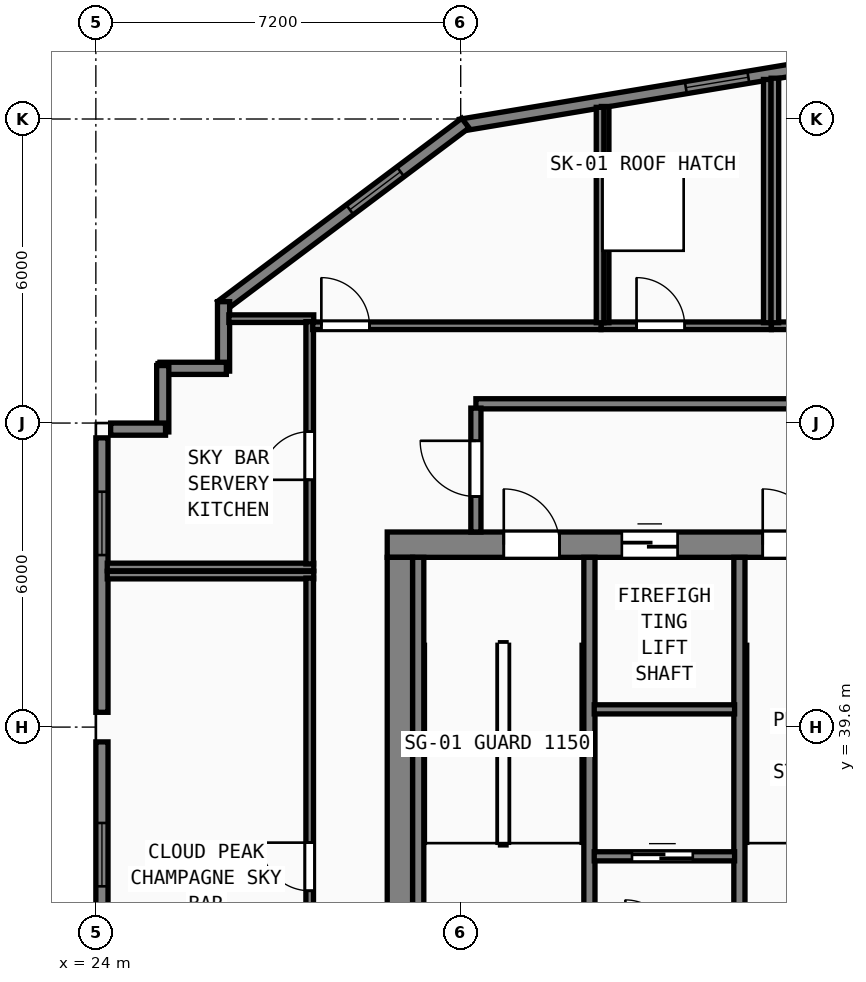
"""IFC4 building model, lengths in metres.
Left out: names, types, materials, properties, quantities, classifications, styles, units other than length and angle.
Written with IfcOpenShell. Run it as: python <this file> out.ifc"""

import sys

from ifc_helpers import new_model, si_unit, direction, frame, frame_2d, origin, origin_2d, place, context, subcontext, project, spatial, rectangle, hollow_rectangle, extrude, element, fill, save


model = new_model("IFC4")
c1 = context("Model", 3, precision=1e-05, world=origin(), true_north=direction((0.0, 1.0)))
c2 = subcontext(c1, "Body", "Model", "MODEL_VIEW")
j1 = project(units=[si_unit("LENGTHUNIT", "METRE"), si_unit("PLANEANGLEUNIT", "RADIAN")], contexts=[c1])
p1 = place(None, origin())
s1 = spatial("IfcSite", under=j1, at=p1, CompositionType="ELEMENT")
p2 = place(p1, origin())
s2 = spatial("IfcBuilding", under=s1, at=p2, CompositionType="ELEMENT")
p3 = place(p2, frame((0.0, 0.0, 323.2)))
s3 = spatial("IfcBuildingStorey", under=s2, at=p3, CompositionType="ELEMENT", Elevation=323.2)
p4 = place(p3, frame((29.75, 43.2, 0.0), z_axis=(0.0, 0.0, 1.0), x_axis=(1.0, 0.0, 0.0)))
e1 = element("IfcWall", 1, at=p4, inside=s3, PredefinedType="SHEAR", context=c2, shape_type="SweptSolid", body=[
    extrude(rectangle(XDim=17.3, YDim=0.5, at=frame_2d((8.65, 0.0))), origin(), (0.0, 0.0, 1.0), 4.75),
])
p5 = place(p4, frame((2.3, 0.0, 0.0)))
e2 = element("IfcOpeningElement", 2, at=p5, cuts=e1, PredefinedType="OPENING", context=c2, shape_type="SweptSolid", body=[
    extrude(rectangle(XDim=1.1, YDim=2.15, at=frame_2d((0.55, 1.075))), frame((0.0, 0.26, 0.0), z_axis=(0.0, -1.0, 0.0), x_axis=(1.0, 0.0, 0.0)), (0.0, 0.0, 1.0), 0.52),
])
p6 = place(p4, frame((7.41, 0.0, 0.0)))
e3 = element("IfcOpeningElement", 3, at=p6, cuts=e1, PredefinedType="OPENING", context=c2, shape_type="SweptSolid", body=[
    extrude(rectangle(XDim=1.1, YDim=2.15, at=frame_2d((0.55, 1.075))), frame((0.0, 0.26, 0.0), z_axis=(0.0, -1.0, 0.0), x_axis=(1.0, 0.0, 0.0)), (0.0, 0.0, 1.0), 0.52),
])
p7 = place(p4, frame((13.5, 0.0, 0.0)))
e4 = element("IfcOpeningElement", 4, at=p7, cuts=e1, PredefinedType="OPENING", context=c2, shape_type="SweptSolid", body=[
    extrude(rectangle(XDim=1.1, YDim=2.15, at=frame_2d((0.55, 1.075))), frame((0.0, 0.26, 0.0), z_axis=(0.0, -1.0, 0.0), x_axis=(1.0, 0.0, 0.0)), (0.0, 0.0, 1.0), 0.52),
])
p8 = place(p4, frame((4.63, 0.0, 0.0)))
e5 = element("IfcOpeningElement", 5, at=p8, cuts=e1, PredefinedType="OPENING", context=c2, shape_type="SweptSolid", body=[
    extrude(rectangle(XDim=1.1, YDim=2.2, at=frame_2d((0.55, 1.1))), frame((0.0, 0.26, 0.0), z_axis=(0.0, -1.0, 0.0), x_axis=(1.0, 0.0, 0.0)), (0.0, 0.0, 1.0), 0.52),
])
p9 = place(p4, frame((10.99, 0.0, 0.0)))
e6 = element("IfcOpeningElement", 6, at=p9, cuts=e1, PredefinedType="OPENING", context=c2, shape_type="SweptSolid", body=[
    extrude(rectangle(XDim=1.1, YDim=2.2, at=frame_2d((0.55, 1.1))), frame((0.0, 0.26, 0.0), z_axis=(0.0, -1.0, 0.0), x_axis=(1.0, 0.0, 0.0)), (0.0, 0.0, 1.0), 0.52),
])
p10 = place(p3, frame((30.0, 32.8, 0.0), z_axis=(0.0, 0.0, 1.0), x_axis=(0.0, 1.0, 0.0)))
e7 = element("IfcWall", 7, at=p10, inside=s3, PredefinedType="SHEAR", context=c2, shape_type="SweptSolid", body=[
    extrude(rectangle(XDim=10.15, YDim=0.5, at=frame_2d((5.075, 0.0))), origin(), (0.0, 0.0, 1.0), 4.75),
])
for number, where, z_axis, x_axis in (
    (8, (30.362, 35.39, 0.0), (0.0, 0.0, 1.0), (0.0, 1.0, 0.0)),
    (9, (33.74, 35.39, 0.0), (0.0, 0.0, 1.0), (0.0, 1.0, 0.0)),
    (10, (36.7, 35.39, 0.0), (0.0, 0.0, 1.0), (0.0, 1.0, 0.0)),
):
    element("IfcWall", number, at=place(p3, frame(where, z_axis=z_axis, x_axis=x_axis)), inside=s3, PredefinedType="SHEAR", context=c2, shape_type="SweptSolid", body=[
        extrude(rectangle(XDim=7.56, YDim=0.22, at=frame_2d((3.78, 0.0))), origin(), (0.0, 0.0, 1.0), 4.75),
    ])
for number, where, z_axis, x_axis in (
    (11, (24.0, 45.6, 0.0), (0.0, 0.0, 1.0), (1.0, 0.0, 0.0)),
    (12, (31.2, 50.4, 0.0), (0.0, 0.0, 1.0), (1.0, 0.0, 0.0)),
    (13, (24.0, 39.6, 0.0), (0.0, 0.0, 1.0), (1.0, 0.0, 0.0)),
):
    element("IfcColumn", number, at=place(p3, frame(where, z_axis=z_axis, x_axis=x_axis)), inside=s3, PredefinedType="COLUMN", context=c2, shape_type="SweptSolid", body=[
        extrude(hollow_rectangle(XDim=0.6, YDim=0.6, WallThickness=0.024, at=origin_2d()), origin(), (0.0, 0.0, 1.0), 5.0),
    ])
p11 = place(p3, frame((38.454, 52.687, 0.0), z_axis=(0.0, 0.0, 1.0), x_axis=(-0.986394820321, -0.164393608283, 0.0)))
e14 = element("IfcWall", 14, at=p11, inside=s3, PredefinedType="SOLIDWALL", context=c2, shape_type="SweptSolid", body=[
    extrude(rectangle(XDim=7.36, YDim=0.24, at=frame_2d((3.68, 0.0))), origin(), (0.0, 0.0, 1.0), 4.75),
])
p12 = place(p11, frame((1.6, 0.0, 0.85)))
e15 = element("IfcOpeningElement", 15, at=p12, cuts=e14, PredefinedType="OPENING", context=c2, shape_type="SweptSolid", body=[
    extrude(rectangle(XDim=1.25, YDim=1.95, at=frame_2d((0.625, 0.975))), frame((0.0, 0.13, 0.0), z_axis=(0.0, -1.0, 0.0), x_axis=(1.0, 0.0, 0.0)), (0.0, 0.0, 1.0), 0.26),
])
p13 = place(p3, frame((31.292, 51.519, 0.0), z_axis=(0.0, 0.0, 1.0), x_axis=(-0.8, -0.6, 0.0)))
e16 = element("IfcWall", 16, at=p13, inside=s3, PredefinedType="SOLIDWALL", context=c2, shape_type="SweptSolid", body=[
    extrude(rectangle(XDim=6.021, YDim=0.24, at=frame_2d((3.01, 0.0))), origin(), (0.0, 0.0, 1.0), 4.75),
])
p14 = place(p13, frame((1.6, 0.0, 0.85)))
e17 = element("IfcOpeningElement", 17, at=p14, cuts=e16, PredefinedType="OPENING", context=c2, shape_type="SweptSolid", body=[
    extrude(rectangle(XDim=1.25, YDim=1.95, at=frame_2d((0.625, 0.975))), frame((0.0, 0.13, 0.0), z_axis=(0.0, -1.0, 0.0), x_axis=(1.0, 0.0, 0.0)), (0.0, 0.0, 1.0), 0.26),
])
p15 = place(p3, frame((26.52, 47.995, 0.0), z_axis=(0.0, 0.0, 1.0), x_axis=(0.0, -1.0, 0.0)))
e18 = element("IfcWall", 18, at=p15, inside=s3, PredefinedType="SOLIDWALL", context=c2, shape_type="SweptSolid", body=[
    extrude(rectangle(XDim=1.37, YDim=0.24, at=frame_2d((0.685, 0.0))), origin(), (0.0, 0.0, 1.0), 4.75),
])
for number, where, z_axis, x_axis in (
    (19, (26.575, 46.68, 0.0), (0.0, 0.0, 1.0), (-1.0, 0.0, 0.0)),
    (20, (25.32, 46.735, 0.0), (0.0, 0.0, 1.0), (0.0, -1.0, 0.0)),
):
    element("IfcWall", number, at=place(p3, frame(where, z_axis=z_axis, x_axis=x_axis)), inside=s3, PredefinedType="SOLIDWALL", context=c2, shape_type="SweptSolid", body=[
        extrude(rectangle(XDim=1.31, YDim=0.24, at=frame_2d((0.655, 0.0))), origin(), (0.0, 0.0, 1.0), 4.75),
    ])
p16 = place(p3, frame((25.375, 45.48, 0.0), z_axis=(0.0, 0.0, 1.0), x_axis=(-1.0, 0.0, 0.0)))
e21 = element("IfcWall", 21, at=p16, inside=s3, PredefinedType="SOLIDWALL", context=c2, shape_type="SweptSolid", body=[
    extrude(rectangle(XDim=1.083, YDim=0.24, at=frame_2d((0.542, 0.0))), origin(), (0.0, 0.0, 1.0), 4.75),
])
p17 = place(p3, frame((24.12, 45.308, 0.0), z_axis=(0.0, 0.0, 1.0), x_axis=(0.0, -1.0, 0.0)))
e22 = element("IfcWall", 22, at=p17, inside=s3, PredefinedType="SOLIDWALL", context=c2, shape_type="SweptSolid", body=[
    extrude(rectangle(XDim=5.416, YDim=0.24, at=frame_2d((2.708, 0.0))), origin(), (0.0, 0.0, 1.0), 4.75),
])
p18 = place(p17, frame((1.063, 0.0, 0.85)))
e23 = element("IfcOpeningElement", 23, at=p18, cuts=e22, PredefinedType="OPENING", context=c2, shape_type="SweptSolid", body=[
    extrude(rectangle(XDim=1.25, YDim=1.95, at=frame_2d((0.625, 0.975))), frame((0.0, 0.13, 0.0), z_axis=(0.0, -1.0, 0.0), x_axis=(1.0, 0.0, 0.0)), (0.0, 0.0, 1.0), 0.26),
])
p19 = place(p3, frame((24.12, 39.308, 0.0), z_axis=(0.0, 0.0, 1.0), x_axis=(0.0, -1.0, 0.0)))
e24 = element("IfcWall", 24, at=p19, inside=s3, PredefinedType="SOLIDWALL", context=c2, shape_type="SweptSolid", body=[
    extrude(rectangle(XDim=5.416, YDim=0.24, at=frame_2d((2.708, 0.0))), origin(), (0.0, 0.0, 1.0), 4.75),
])
p20 = place(p19, frame((1.6, 0.0, 0.85)))
e25 = element("IfcOpeningElement", 25, at=p20, cuts=e24, PredefinedType="OPENING", context=c2, shape_type="SweptSolid", body=[
    extrude(rectangle(XDim=1.25, YDim=1.95, at=frame_2d((0.625, 0.975))), frame((0.0, 0.13, 0.0), z_axis=(0.0, -1.0, 0.0), x_axis=(1.0, 0.0, 0.0)), (0.0, 0.0, 1.0), 0.26),
])
p21 = place(p3, frame((31.5, 45.98, 0.0), z_axis=(0.0, 0.0, 1.0), x_axis=(1.0, 0.0, 0.0)))
e26 = element("IfcWall", 26, at=p21, inside=s3, PredefinedType="SOLIDWALL", context=c2, shape_type="SweptSolid", body=[
    extrude(rectangle(XDim=13.8, YDim=0.2, at=frame_2d((6.9, 0.0))), origin(), (0.0, 0.0, 1.0), 4.75),
])
p22 = place(p3, frame((31.5, 43.45, 0.0), z_axis=(0.0, 0.0, 1.0), x_axis=(0.0, 1.0, 0.0)))
e27 = element("IfcWall", 27, at=p22, inside=s3, PredefinedType="SOLIDWALL", context=c2, shape_type="SweptSolid", body=[
    extrude(rectangle(XDim=2.445, YDim=0.2, at=frame_2d((1.223, 0.0))), origin(), (0.0, 0.0, 1.0), 4.75),
])
p23 = place(p22, frame((1.8, 0.0, 0.0), z_axis=(0.0, 0.0, 1.0), x_axis=(-1.0, 0.0, 0.0)))
e28 = element("IfcOpeningElement", 28, at=p23, cuts=e27, PredefinedType="OPENING", context=c2, shape_type="SweptSolid", body=[
    extrude(rectangle(XDim=1.1, YDim=2.15, at=frame_2d((0.55, 1.075))), frame((0.0, 0.11, 0.0), z_axis=(0.0, -1.0, 0.0), x_axis=(1.0, 0.0, 0.0)), (0.0, 0.0, 1.0), 0.22),
])
p24 = place(p3, frame((33.835, 39.95, 0.0), z_axis=(0.0, 0.0, 1.0), x_axis=(1.0, 0.0, 0.0)))
e29 = element("IfcWall", 29, at=p24, inside=s3, PredefinedType="SOLIDWALL", context=c2, shape_type="SweptSolid", body=[
    extrude(rectangle(XDim=2.77, YDim=0.18, at=frame_2d((1.385, 0.0))), origin(), (0.0, 0.0, 1.0), 4.75),
])
p25 = place(p3, frame((33.835, 37.05, 0.0), z_axis=(0.0, 0.0, 1.0), x_axis=(1.0, 0.0, 0.0)))
e30 = element("IfcWall", 30, at=p25, inside=s3, PredefinedType="SOLIDWALL", context=c2, shape_type="SweptSolid", body=[
    extrude(rectangle(XDim=2.77, YDim=0.18, at=frame_2d((1.385, 0.0))), origin(), (0.0, 0.0, 1.0), 4.75),
])
p26 = place(p25, frame((1.945, 0.0, 0.0), z_axis=(0.0, 0.0, 1.0), x_axis=(-1.0, 0.0, 0.0)))
e31 = element("IfcOpeningElement", 31, at=p26, cuts=e30, PredefinedType="OPENING", context=c2, shape_type="SweptSolid", body=[
    extrude(rectangle(XDim=1.2, YDim=2.2, at=frame_2d((0.6, 1.1))), frame((0.0, 0.1, 0.0), z_axis=(0.0, -1.0, 0.0), x_axis=(1.0, 0.0, 0.0)), (0.0, 0.0, 1.0), 0.2),
])
p27 = place(p3, frame((33.97, 47.52, 0.0), z_axis=(0.0, 0.0, 1.0), x_axis=(1.0, 0.0, 0.0)))
e32 = element("IfcWall", 32, at=p27, inside=s3, PredefinedType="PARTITIONING", context=c2, shape_type="SweptSolid", body=[
    extrude(rectangle(XDim=3.36, YDim=0.15, at=frame_2d((1.68, 0.0))), origin(), (0.0, 0.0, 1.0), 4.75),
])
p28 = place(p27, frame((0.7, 0.0, 0.0)))
e33 = element("IfcOpeningElement", 33, at=p28, cuts=e32, PredefinedType="OPENING", context=c2, shape_type="SweptSolid", body=[
    extrude(rectangle(XDim=0.95, YDim=2.12, at=frame_2d((0.475, 1.06))), frame((0.0, 0.085, 0.0), z_axis=(0.0, -1.0, 0.0), x_axis=(1.0, 0.0, 0.0)), (0.0, 0.0, 1.0), 0.17),
])
p29 = place(p3, frame((34.05, 47.58, 0.0), z_axis=(0.0, 0.0, 1.0), x_axis=(0.0, 1.0, 0.0)))
e34 = element("IfcWall", 34, at=p29, inside=s3, PredefinedType="PARTITIONING", context=c2, shape_type="SweptSolid", body=[
    extrude(rectangle(XDim=4.267, YDim=0.15, at=frame_2d((2.133, 0.0))), origin(), (0.0, 0.0, 1.0), 4.75),
])
p30 = place(p3, frame((37.25, 47.58, 0.0), z_axis=(0.0, 0.0, 1.0), x_axis=(0.0, 1.0, 0.0)))
e35 = element("IfcWall", 35, at=p30, inside=s3, PredefinedType="PARTITIONING", context=c2, shape_type="SweptSolid", body=[
    extrude(rectangle(XDim=4.8, YDim=0.15, at=frame_2d((2.4, 0.0))), origin(), (0.0, 0.0, 1.0), 4.75),
])
p31 = place(p3, frame((37.332, 47.52, 0.0), z_axis=(0.0, 0.0, 1.0), x_axis=(1.0, 0.0, 0.0)))
e36 = element("IfcWall", 36, at=p31, inside=s3, PredefinedType="PARTITIONING", context=c2, shape_type="SweptSolid", body=[
    extrude(rectangle(XDim=3.348, YDim=0.15, at=frame_2d((1.674, 0.0))), origin(), (0.0, 0.0, 1.0), 4.75),
])
p32 = place(p31, frame((0.688, 0.0, 0.0)))
e37 = element("IfcOpeningElement", 37, at=p32, cuts=e36, PredefinedType="OPENING", context=c2, shape_type="SweptSolid", body=[
    extrude(rectangle(XDim=0.95, YDim=2.12, at=frame_2d((0.475, 1.06))), frame((0.0, 0.085, 0.0), z_axis=(0.0, -1.0, 0.0), x_axis=(1.0, 0.0, 0.0)), (0.0, 0.0, 1.0), 0.17),
])
p33 = place(p3, frame((37.4, 47.58, 0.0), z_axis=(0.0, 0.0, 1.0), x_axis=(0.0, 1.0, 0.0)))
e38 = element("IfcWall", 38, at=p33, inside=s3, PredefinedType="PARTITIONING", context=c2, shape_type="SweptSolid", body=[
    extrude(rectangle(XDim=4.825, YDim=0.15, at=frame_2d((2.413, 0.0))), origin(), (0.0, 0.0, 1.0), 4.75),
])
p34 = place(p3, frame((24.225, 42.6, 0.0), z_axis=(0.0, 0.0, 1.0), x_axis=(1.0, 0.0, 0.0)))
e39 = element("IfcWall", 39, at=p34, inside=s3, PredefinedType="PARTITIONING", context=c2, shape_type="SweptSolid", body=[
    extrude(rectangle(XDim=4.075, YDim=0.15, at=frame_2d((2.038, 0.0))), origin(), (0.0, 0.0, 1.0), 4.75),
])
p35 = place(p3, frame((28.22, 32.91, 0.0), z_axis=(0.0, 0.0, 1.0), x_axis=(0.0, 1.0, 0.0)))
e40 = element("IfcWall", 40, at=p35, inside=s3, PredefinedType="PARTITIONING", context=c2, shape_type="SweptSolid", body=[
    extrude(rectangle(XDim=9.63, YDim=0.15, at=frame_2d((4.815, 0.0))), origin(), (0.0, 0.0, 1.0), 4.75),
])
p36 = place(p35, frame((4.41, 0.0, 0.0), z_axis=(0.0, 0.0, 1.0), x_axis=(-1.0, 0.0, 0.0)))
e41 = element("IfcOpeningElement", 41, at=p36, cuts=e40, PredefinedType="OPENING", context=c2, shape_type="SweptSolid", body=[
    extrude(rectangle(XDim=0.95, YDim=2.12, at=frame_2d((0.475, 1.06))), frame((0.0, 0.085, 0.0), z_axis=(0.0, -1.0, 0.0), x_axis=(1.0, 0.0, 0.0)), (0.0, 0.0, 1.0), 0.17),
])
p37 = place(p3, frame((26.625, 47.66, 0.0), z_axis=(0.0, 0.0, 1.0), x_axis=(1.0, 0.0, 0.0)))
e42 = element("IfcWall", 42, at=p37, inside=s3, PredefinedType="PARTITIONING", context=c2, shape_type="SweptSolid", body=[
    extrude(rectangle(XDim=1.675, YDim=0.15, at=frame_2d((0.837, 0.0))), origin(), (0.0, 0.0, 1.0), 4.75),
])
p38 = place(p3, frame((24.225, 42.76, 0.0), z_axis=(0.0, 0.0, 1.0), x_axis=(1.0, 0.0, 0.0)))
e43 = element("IfcWall", 43, at=p38, inside=s3, PredefinedType="PARTITIONING", context=c2, shape_type="SweptSolid", body=[
    extrude(rectangle(XDim=4.075, YDim=0.15, at=frame_2d((2.038, 0.0))), origin(), (0.0, 0.0, 1.0), 4.75),
])
p39 = place(p3, frame((28.22, 42.82, 0.0), z_axis=(0.0, 0.0, 1.0), x_axis=(0.0, 1.0, 0.0)))
e44 = element("IfcWall", 44, at=p39, inside=s3, PredefinedType="PARTITIONING", context=c2, shape_type="SweptSolid", body=[
    extrude(rectangle(XDim=4.78, YDim=0.15, at=frame_2d((2.39, 0.0))), origin(), (0.0, 0.0, 1.0), 4.75),
])
p40 = place(p39, frame((2.61, 0.0, 0.0), z_axis=(0.0, 0.0, 1.0), x_axis=(-1.0, 0.0, 0.0)))
e45 = element("IfcOpeningElement", 45, at=p40, cuts=e44, PredefinedType="OPENING", context=c2, shape_type="SweptSolid", body=[
    extrude(rectangle(XDim=0.95, YDim=2.12, at=frame_2d((0.475, 1.06))), frame((0.0, 0.085, 0.0), z_axis=(0.0, -1.0, 0.0), x_axis=(1.0, 0.0, 0.0)), (0.0, 0.0, 1.0), 0.17),
])
p41 = place(p3, frame((28.28, 47.52, 0.0), z_axis=(0.0, 0.0, 1.0), x_axis=(1.0, 0.0, 0.0)))
e46 = element("IfcWall", 46, at=p41, inside=s3, PredefinedType="PARTITIONING", context=c2, shape_type="SweptSolid", body=[
    extrude(rectangle(XDim=5.688, YDim=0.15, at=frame_2d((2.844, 0.0))), origin(), (0.0, 0.0, 1.0), 4.75),
])
p42 = place(p41, frame((0.17, 0.0, 0.0)))
e47 = element("IfcOpeningElement", 47, at=p42, cuts=e46, PredefinedType="OPENING", context=c2, shape_type="SweptSolid", body=[
    extrude(rectangle(XDim=0.95, YDim=2.12, at=frame_2d((0.475, 1.06))), frame((0.0, 0.085, 0.0), z_axis=(0.0, -1.0, 0.0), x_axis=(1.0, 0.0, 0.0)), (0.0, 0.0, 1.0), 0.17),
])
p43 = place(p3, frame((33.95, 47.58, 0.0), z_axis=(0.0, 0.0, 1.0), x_axis=(0.0, 1.0, 0.0)))
e48 = element("IfcWall", 48, at=p43, inside=s3, PredefinedType="PARTITIONING", context=c2, shape_type="SweptSolid", body=[
    extrude(rectangle(XDim=4.25, YDim=0.15, at=frame_2d((2.125, 0.0))), origin(), (0.0, 0.0, 1.0), 4.75),
])
p44 = place(p12, origin())
e49 = element("IfcWindow", 49, at=p44, inside=s3, PartitioningType="SINGLE_PANEL", PredefinedType="WINDOW", context=c2, shape_type="SweptSolid", body=[
    extrude(rectangle(XDim=1.25, YDim=1.95, at=frame_2d((0.625, 0.975))), frame((0.0, 0.03, 0.0), z_axis=(0.0, -1.0, 0.0), x_axis=(1.0, 0.0, 0.0)), (0.0, 0.0, 1.0), 0.06),
])
fill(e15, e49)
p45 = place(p14, origin())
e50 = element("IfcWindow", 50, at=p45, inside=s3, PartitioningType="SINGLE_PANEL", PredefinedType="WINDOW", context=c2, shape_type="SweptSolid", body=[
    extrude(rectangle(XDim=1.25, YDim=1.95, at=frame_2d((0.625, 0.975))), frame((0.0, 0.03, 0.0), z_axis=(0.0, -1.0, 0.0), x_axis=(1.0, 0.0, 0.0)), (0.0, 0.0, 1.0), 0.06),
])
fill(e17, e50)
p46 = place(p18, origin())
e51 = element("IfcWindow", 51, at=p46, inside=s3, PartitioningType="SINGLE_PANEL", PredefinedType="WINDOW", context=c2, shape_type="SweptSolid", body=[
    extrude(rectangle(XDim=1.25, YDim=1.95, at=frame_2d((0.625, 0.975))), frame((0.0, 0.03, 0.0), z_axis=(0.0, -1.0, 0.0), x_axis=(1.0, 0.0, 0.0)), (0.0, 0.0, 1.0), 0.06),
])
fill(e23, e51)
p47 = place(p20, origin())
e52 = element("IfcWindow", 52, at=p47, inside=s3, PartitioningType="SINGLE_PANEL", PredefinedType="WINDOW", context=c2, shape_type="SweptSolid", body=[
    extrude(rectangle(XDim=1.25, YDim=1.95, at=frame_2d((0.625, 0.975))), frame((0.0, 0.03, 0.0), z_axis=(0.0, -1.0, 0.0), x_axis=(1.0, 0.0, 0.0)), (0.0, 0.0, 1.0), 0.06),
])
fill(e25, e52)
p48 = place(p3, frame((0.0, 0.0, -0.24)))
p49 = place(p48, frame((34.8, 49.8, 0.0)))
p50 = place(p49, frame((0.0, 0.0, 0.19)))
e53 = element("IfcWindow", 53, at=p50, inside=s3, PartitioningType="SINGLE_PANEL", PredefinedType="SKYLIGHT", context=c2, shape_type="SweptSolid", body=[
    extrude(rectangle(XDim=1.6, YDim=1.6, at=origin_2d()), origin(), (0.0, 0.0, 1.0), 0.05),
])
p51 = place(p5, origin())
e54 = element("IfcDoor", 54, at=p51, inside=s3, OperationType="SINGLE_SWING_LEFT", PredefinedType="DOOR", context=c2, shape_type="SweptSolid", body=[
    extrude(rectangle(XDim=1.1, YDim=2.15, at=frame_2d((0.55, 1.075))), frame((0.0, 0.185, 0.0), z_axis=(0.0, -1.0, 0.0), x_axis=(1.0, 0.0, 0.0)), (0.0, 0.0, 1.0), 0.05),
])
fill(e2, e54)
p52 = place(p6, origin())
e55 = element("IfcDoor", 55, at=p52, inside=s3, OperationType="SINGLE_SWING_LEFT", PredefinedType="DOOR", context=c2, shape_type="SweptSolid", body=[
    extrude(rectangle(XDim=1.1, YDim=2.15, at=frame_2d((0.55, 1.075))), frame((0.0, 0.185, 0.0), z_axis=(0.0, -1.0, 0.0), x_axis=(1.0, 0.0, 0.0)), (0.0, 0.0, 1.0), 0.05),
])
fill(e3, e55)
p53 = place(p23, origin())
e56 = element("IfcDoor", 56, at=p53, inside=s3, OperationType="SINGLE_SWING_LEFT", PredefinedType="DOOR", context=c2, shape_type="SweptSolid", body=[
    extrude(rectangle(XDim=1.1, YDim=2.15, at=frame_2d((0.55, 1.075))), frame((0.0, 0.025, 0.0), z_axis=(0.0, -1.0, 0.0), x_axis=(1.0, 0.0, 0.0)), (0.0, 0.0, 1.0), 0.05),
])
fill(e28, e56)
p54 = place(p8, origin())
e57 = element("IfcDoor", 57, at=p54, inside=s3, OperationType="SLIDING_TO_LEFT", PredefinedType="DOOR", context=c2, shape_type="SweptSolid", body=[
    extrude(rectangle(XDim=1.1, YDim=2.2, at=frame_2d((0.55, 1.1))), frame((0.0, 0.185, 0.0), z_axis=(0.0, -1.0, 0.0), x_axis=(1.0, 0.0, 0.0)), (0.0, 0.0, 1.0), 0.05),
])
fill(e5, e57)
p55 = place(p26, origin())
e58 = element("IfcDoor", 58, at=p55, inside=s3, OperationType="SLIDING_TO_RIGHT", PredefinedType="DOOR", context=c2, shape_type="SweptSolid", body=[
    extrude(rectangle(XDim=1.2, YDim=2.2, at=frame_2d((0.6, 1.1))), frame((0.0, 0.025, 0.0), z_axis=(0.0, -1.0, 0.0), x_axis=(1.0, 0.0, 0.0)), (0.0, 0.0, 1.0), 0.05),
])
fill(e31, e58)
p56 = place(p28, origin())
e59 = element("IfcDoor", 59, at=p56, inside=s3, OperationType="SINGLE_SWING_LEFT", PredefinedType="DOOR", context=c2, shape_type="SweptSolid", body=[
    extrude(rectangle(XDim=0.95, YDim=2.12, at=frame_2d((0.475, 1.06))), frame((0.0, 0.025, 0.0), z_axis=(0.0, -1.0, 0.0), x_axis=(1.0, 0.0, 0.0)), (0.0, 0.0, 1.0), 0.05),
])
fill(e33, e59)
p57 = place(p36, origin())
e60 = element("IfcDoor", 60, at=p57, inside=s3, OperationType="SINGLE_SWING_LEFT", PredefinedType="DOOR", context=c2, shape_type="SweptSolid", body=[
    extrude(rectangle(XDim=0.95, YDim=2.12, at=frame_2d((0.475, 1.06))), frame((0.0, 0.025, 0.0), z_axis=(0.0, -1.0, 0.0), x_axis=(1.0, 0.0, 0.0)), (0.0, 0.0, 1.0), 0.05),
])
fill(e41, e60)
p58 = place(p40, origin())
e61 = element("IfcDoor", 61, at=p58, inside=s3, OperationType="SINGLE_SWING_RIGHT", PredefinedType="DOOR", context=c2, shape_type="SweptSolid", body=[
    extrude(rectangle(XDim=0.95, YDim=2.12, at=frame_2d((0.475, 1.06))), frame((0.0, 0.025, 0.0), z_axis=(0.0, -1.0, 0.0), x_axis=(1.0, 0.0, 0.0)), (0.0, 0.0, 1.0), 0.05),
])
fill(e45, e61)
p59 = place(p42, origin())
e62 = element("IfcDoor", 62, at=p59, inside=s3, OperationType="SINGLE_SWING_LEFT", PredefinedType="DOOR", context=c2, shape_type="SweptSolid", body=[
    extrude(rectangle(XDim=0.95, YDim=2.12, at=frame_2d((0.475, 1.06))), frame((0.0, 0.025, 0.0), z_axis=(0.0, -1.0, 0.0), x_axis=(1.0, 0.0, 0.0)), (0.0, 0.0, 1.0), 0.05),
])
fill(e47, e62)
save(model, sys.argv[1])
